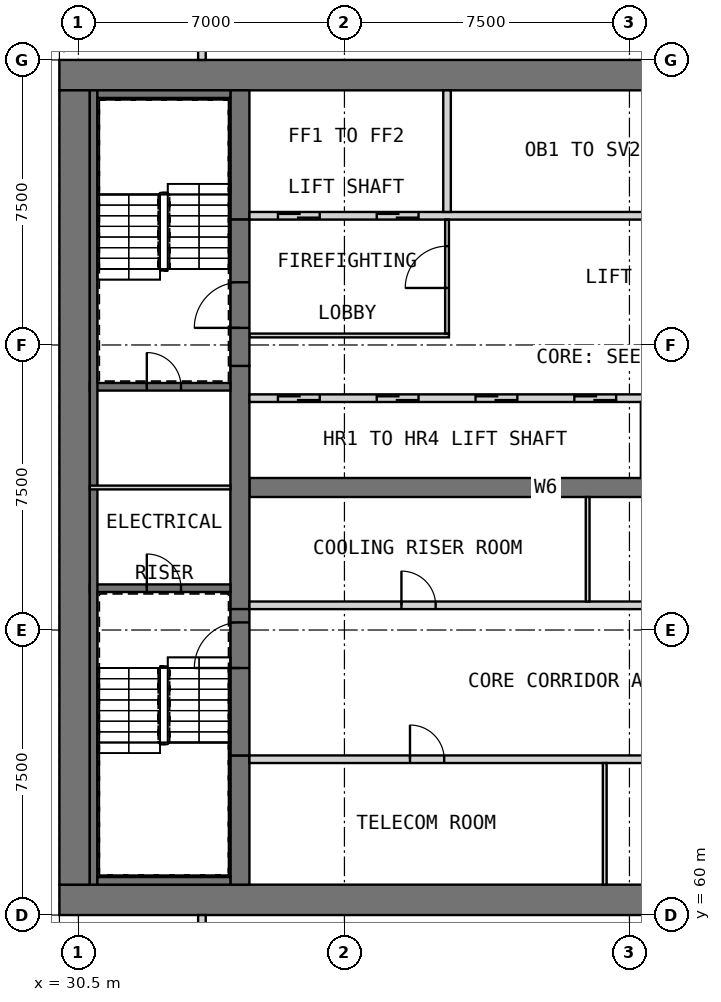
"""IFC4 building model, lengths in metres.
Left out: names, types, materials, properties, quantities, classifications, styles, units other than length and angle.
Written with IfcOpenShell. Run it as: python <this file> out.ifc"""

import sys

from ifc_helpers import new_model, si_unit, direction, frame, frame_2d, origin, place, context, subcontext, project, spatial, rectangle, extrude, element, fill, save


model = new_model("IFC4")
c1 = context("Model", 3, precision=1e-05, world=origin(), true_north=direction((0.0, 1.0)))
c2 = subcontext(c1, "Body", "Model", "MODEL_VIEW")
j1 = project(units=[si_unit("LENGTHUNIT", "METRE"), si_unit("PLANEANGLEUNIT", "RADIAN")], contexts=[c1])
p1 = place(None, origin())
s1 = spatial("IfcSite", under=j1, at=p1, CompositionType="ELEMENT")
p2 = place(p1, origin())
s2 = spatial("IfcBuilding", under=s1, at=p2, CompositionType="ELEMENT")
p3 = place(p2, frame((0.0, 0.0, 214.2)))
s3 = spatial("IfcBuildingStorey", under=s2, at=p3, CompositionType="ELEMENT", Elevation=214.2)
p4 = place(p3, frame((30.0, 60.4, 0.0), z_axis=(0.0, 0.0, 1.0), x_axis=(1.0, 0.0, 0.0)))
e1 = element("IfcWall", 1, at=p4, inside=s3, PredefinedType="SHEAR", context=c2, shape_type="SweptSolid", body=[
    extrude(rectangle(XDim=30.0, YDim=0.8, at=frame_2d((15.0, 0.0))), origin(), (0.0, 0.0, 1.0), 5.5),
])
p5 = place(p4, frame((21.9, 0.0, 0.0)))
e2 = element("IfcOpeningElement", 2, at=p5, cuts=e1, PredefinedType="OPENING", context=c2, shape_type="SweptSolid", body=[
    extrude(rectangle(XDim=1.8, YDim=2.1, at=frame_2d((0.9, 1.05))), frame((0.0, 0.41, 0.0), z_axis=(0.0, -1.0, 0.0), x_axis=(1.0, 0.0, 0.0)), (0.0, 0.0, 1.0), 0.82),
])
p6 = place(p4, frame((26.5, 0.0, 0.0)))
e3 = element("IfcOpeningElement", 3, at=p6, cuts=e1, PredefinedType="OPENING", context=c2, shape_type="SweptSolid", body=[
    extrude(rectangle(XDim=1.2, YDim=2.1, at=frame_2d((0.6, 1.05))), frame((0.0, 0.41, 0.0), z_axis=(0.0, -1.0, 0.0), x_axis=(1.0, 0.0, 0.0)), (0.0, 0.0, 1.0), 0.82),
])
p7 = place(p3, frame((30.0, 82.1, 0.0), z_axis=(0.0, 0.0, 1.0), x_axis=(1.0, 0.0, 0.0)))
e4 = element("IfcWall", 4, at=p7, inside=s3, PredefinedType="SHEAR", context=c2, shape_type="SweptSolid", body=[
    extrude(rectangle(XDim=30.0, YDim=0.8, at=frame_2d((15.0, 0.0))), origin(), (0.0, 0.0, 1.0), 5.5),
])
p8 = place(p3, frame((30.4, 60.8, 0.0), z_axis=(0.0, 0.0, 1.0), x_axis=(0.0, 1.0, 0.0)))
e5 = element("IfcWall", 5, at=p8, inside=s3, PredefinedType="SHEAR", context=c2, shape_type="SweptSolid", body=[
    extrude(rectangle(XDim=20.9, YDim=0.8, at=frame_2d((10.45, 0.0))), origin(), (0.0, 0.0, 1.0), 5.5),
])
p9 = place(p3, frame((35.0, 71.25, 0.0), z_axis=(0.0, 0.0, 1.0), x_axis=(1.0, 0.0, 0.0)))
e6 = element("IfcWall", 6, at=p9, inside=s3, PredefinedType="SHEAR", context=c2, shape_type="SweptSolid", body=[
    extrude(rectangle(XDim=15.6, YDim=0.5, at=frame_2d((7.8, 0.0))), origin(), (0.0, 0.0, 1.0), 5.5),
])
p10 = place(p3, frame((34.75, 60.8, 0.0), z_axis=(0.0, 0.0, 1.0), x_axis=(0.0, 1.0, 0.0)))
e7 = element("IfcWall", 7, at=p10, inside=s3, PredefinedType="SHEAR", context=c2, shape_type="SweptSolid", body=[
    extrude(rectangle(XDim=3.4, YDim=0.5, at=frame_2d((1.7, 0.0))), origin(), (0.0, 0.0, 1.0), 5.5),
])
p11 = place(p3, frame((34.75, 68.05, 0.0), z_axis=(0.0, 0.0, 1.0), x_axis=(0.0, 1.0, 0.0)))
e8 = element("IfcWall", 8, at=p11, inside=s3, PredefinedType="SHEAR", context=c2, shape_type="SweptSolid", body=[
    extrude(rectangle(XDim=6.4, YDim=0.5, at=frame_2d((3.2, 0.0))), origin(), (0.0, 0.0, 1.0), 5.5),
])
p12 = place(p3, frame((34.75, 78.3, 0.0), z_axis=(0.0, 0.0, 1.0), x_axis=(0.0, 1.0, 0.0)))
e9 = element("IfcWall", 9, at=p12, inside=s3, PredefinedType="SHEAR", context=c2, shape_type="SweptSolid", body=[
    extrude(rectangle(XDim=3.4, YDim=0.5, at=frame_2d((1.7, 0.0))), origin(), (0.0, 0.0, 1.0), 5.5),
])
p13 = place(p2, frame((0.0, 0.0, 34.0)))
s4 = spatial("IfcBuildingStorey", under=s2, at=p13, CompositionType="ELEMENT", Elevation=34.0)
for number, where, z_axis, x_axis in (
    (10, (29.7, 61.05, 0.0), (0.0, 0.0, 1.0), (0.0, 1.0, 0.0)),
    (11, (29.7, 65.925, 0.0), (0.0, 0.0, 1.0), (0.0, 1.0, 0.0)),
    (12, (29.7, 70.8, 0.0), (0.0, 0.0, 1.0), (0.0, 1.0, 0.0)),
    (13, (29.7, 75.675, 0.0), (0.0, 0.0, 1.0), (0.0, 1.0, 0.0)),
    (14, (29.7, 80.55, 0.0), (0.0, 0.0, 1.0), (0.0, 1.0, 0.0)),
):
    element("IfcWall", number, at=place(p13, frame(where, z_axis=z_axis, x_axis=x_axis)), inside=s4, PredefinedType="SOLIDWALL", context=c2, shape_type="SweptSolid", body=[
        extrude(rectangle(XDim=0.9, YDim=0.6, at=frame_2d((0.45, 0.0))), origin(), (0.0, 0.0, 1.0), 286.2),
    ])
p14 = place(p3, frame((35.0, 64.1, 0.0), z_axis=(0.0, 0.0, 1.0), x_axis=(1.0, 0.0, 0.0)))
e15 = element("IfcWall", 15, at=p14, inside=s3, PredefinedType="PARTITIONING", context=c2, shape_type="SweptSolid", body=[
    extrude(rectangle(XDim=15.6, YDim=0.2, at=frame_2d((7.8, 0.0))), origin(), (0.0, 0.0, 1.0), 5.25),
])
p15 = place(p14, frame((4.225, 0.0, 0.0)))
e16 = element("IfcOpeningElement", 16, at=p15, cuts=e15, PredefinedType="OPENING", context=c2, shape_type="SweptSolid", body=[
    extrude(rectangle(XDim=0.9, YDim=2.1, at=frame_2d((0.45, 1.05))), frame((0.0, 0.11, 0.0), z_axis=(0.0, -1.0, 0.0), x_axis=(1.0, 0.0, 0.0)), (0.0, 0.0, 1.0), 0.22),
])
p16 = place(p14, frame((12.025, 0.0, 0.0)))
e17 = element("IfcOpeningElement", 17, at=p16, cuts=e15, PredefinedType="OPENING", context=c2, shape_type="SweptSolid", body=[
    extrude(rectangle(XDim=0.9, YDim=2.1, at=frame_2d((0.45, 1.05))), frame((0.0, 0.11, 0.0), z_axis=(0.0, -1.0, 0.0), x_axis=(1.0, 0.0, 0.0)), (0.0, 0.0, 1.0), 0.22),
])
p17 = place(p3, frame((44.35, 60.8, 0.0), z_axis=(0.0, 0.0, 1.0), x_axis=(0.0, 1.0, 0.0)))
e18 = element("IfcWall", 18, at=p17, inside=s3, PredefinedType="PARTITIONING", context=c2, shape_type="SweptSolid", body=[
    extrude(rectangle(XDim=3.2, YDim=0.1, at=frame_2d((1.6, 0.0))), origin(), (0.0, 0.0, 1.0), 5.25),
])
p18 = place(p3, frame((35.0, 68.15, 0.0), z_axis=(0.0, 0.0, 1.0), x_axis=(1.0, 0.0, 0.0)))
e19 = element("IfcWall", 19, at=p18, inside=s3, PredefinedType="PARTITIONING", context=c2, shape_type="SweptSolid", body=[
    extrude(rectangle(XDim=15.6, YDim=0.2, at=frame_2d((7.8, 0.0))), origin(), (0.0, 0.0, 1.0), 5.25),
])
p19 = place(p18, frame((4.0, 0.0, 0.0)))
e20 = element("IfcOpeningElement", 20, at=p19, cuts=e19, PredefinedType="OPENING", context=c2, shape_type="SweptSolid", body=[
    extrude(rectangle(XDim=0.9, YDim=2.1, at=frame_2d((0.45, 1.05))), frame((0.0, 0.11, 0.0), z_axis=(0.0, -1.0, 0.0), x_axis=(1.0, 0.0, 0.0)), (0.0, 0.0, 1.0), 0.22),
])
p20 = place(p18, frame((11.8, 0.0, 0.0)))
e21 = element("IfcOpeningElement", 21, at=p20, cuts=e19, PredefinedType="OPENING", context=c2, shape_type="SweptSolid", body=[
    extrude(rectangle(XDim=0.9, YDim=2.1, at=frame_2d((0.45, 1.05))), frame((0.0, 0.11, 0.0), z_axis=(0.0, -1.0, 0.0), x_axis=(1.0, 0.0, 0.0)), (0.0, 0.0, 1.0), 0.22),
])
p21 = place(p3, frame((43.9, 68.25, 0.0), z_axis=(0.0, 0.0, 1.0), x_axis=(0.0, 1.0, 0.0)))
e22 = element("IfcWall", 22, at=p21, inside=s3, PredefinedType="PARTITIONING", context=c2, shape_type="SweptSolid", body=[
    extrude(rectangle(XDim=2.75, YDim=0.1, at=frame_2d((1.375, 0.0))), origin(), (0.0, 0.0, 1.0), 5.25),
])
p22 = place(p3, frame((35.0, 73.6, 0.0), z_axis=(0.0, 0.0, 1.0), x_axis=(1.0, 0.0, 0.0)))
e23 = element("IfcWall", 23, at=p22, inside=s3, PredefinedType="SOLIDWALL", context=c2, shape_type="SweptSolid", body=[
    extrude(rectangle(XDim=15.6, YDim=0.2, at=frame_2d((7.8, 0.0))), origin(), (0.0, 0.0, 1.0), 5.5),
])
p23 = place(p22, frame((0.75, 0.0, 0.0)))
e24 = element("IfcOpeningElement", 24, at=p23, cuts=e23, PredefinedType="OPENING", context=c2, shape_type="SweptSolid", body=[
    extrude(rectangle(XDim=1.1, YDim=2.1, at=frame_2d((0.55, 1.05))), frame((0.0, 0.11, 0.0), z_axis=(0.0, -1.0, 0.0), x_axis=(1.0, 0.0, 0.0)), (0.0, 0.0, 1.0), 0.22),
])
p24 = place(p22, frame((3.35, 0.0, 0.0)))
e25 = element("IfcOpeningElement", 25, at=p24, cuts=e23, PredefinedType="OPENING", context=c2, shape_type="SweptSolid", body=[
    extrude(rectangle(XDim=1.1, YDim=2.1, at=frame_2d((0.55, 1.05))), frame((0.0, 0.11, 0.0), z_axis=(0.0, -1.0, 0.0), x_axis=(1.0, 0.0, 0.0)), (0.0, 0.0, 1.0), 0.22),
])
p25 = place(p22, frame((5.95, 0.0, 0.0)))
e26 = element("IfcOpeningElement", 26, at=p25, cuts=e23, PredefinedType="OPENING", context=c2, shape_type="SweptSolid", body=[
    extrude(rectangle(XDim=1.1, YDim=2.1, at=frame_2d((0.55, 1.05))), frame((0.0, 0.11, 0.0), z_axis=(0.0, -1.0, 0.0), x_axis=(1.0, 0.0, 0.0)), (0.0, 0.0, 1.0), 0.22),
])
p26 = place(p22, frame((8.55, 0.0, 0.0)))
e27 = element("IfcOpeningElement", 27, at=p26, cuts=e23, PredefinedType="OPENING", context=c2, shape_type="SweptSolid", body=[
    extrude(rectangle(XDim=1.1, YDim=2.1, at=frame_2d((0.55, 1.05))), frame((0.0, 0.11, 0.0), z_axis=(0.0, -1.0, 0.0), x_axis=(1.0, 0.0, 0.0)), (0.0, 0.0, 1.0), 0.22),
])
p27 = place(p22, frame((11.15, 0.0, 0.0)))
e28 = element("IfcOpeningElement", 28, at=p27, cuts=e23, PredefinedType="OPENING", context=c2, shape_type="SweptSolid", body=[
    extrude(rectangle(XDim=1.1, YDim=2.1, at=frame_2d((0.55, 1.05))), frame((0.0, 0.11, 0.0), z_axis=(0.0, -1.0, 0.0), x_axis=(1.0, 0.0, 0.0)), (0.0, 0.0, 1.0), 0.22),
])
p28 = place(p22, frame((13.75, 0.0, 0.0)))
e29 = element("IfcOpeningElement", 29, at=p28, cuts=e23, PredefinedType="OPENING", context=c2, shape_type="SweptSolid", body=[
    extrude(rectangle(XDim=1.1, YDim=2.1, at=frame_2d((0.55, 1.05))), frame((0.0, 0.11, 0.0), z_axis=(0.0, -1.0, 0.0), x_axis=(1.0, 0.0, 0.0)), (0.0, 0.0, 1.0), 0.22),
])
p29 = place(p3, frame((45.4, 71.5, 0.0), z_axis=(0.0, 0.0, 1.0), x_axis=(0.0, 1.0, 0.0)))
e30 = element("IfcWall", 30, at=p29, inside=s3, PredefinedType="SOLIDWALL", context=c2, shape_type="SweptSolid", body=[
    extrude(rectangle(XDim=2.0, YDim=0.2, at=frame_2d((1.0, 0.0))), origin(), (0.0, 0.0, 1.0), 5.5),
])
p30 = place(p3, frame((35.0, 78.4, 0.0), z_axis=(0.0, 0.0, 1.0), x_axis=(1.0, 0.0, 0.0)))
e31 = element("IfcWall", 31, at=p30, inside=s3, PredefinedType="SOLIDWALL", context=c2, shape_type="SweptSolid", body=[
    extrude(rectangle(XDim=15.6, YDim=0.2, at=frame_2d((7.8, 0.0))), origin(), (0.0, 0.0, 1.0), 5.5),
])
p31 = place(p30, frame((0.75, 0.0, 0.0)))
e32 = element("IfcOpeningElement", 32, at=p31, cuts=e31, PredefinedType="OPENING", context=c2, shape_type="SweptSolid", body=[
    extrude(rectangle(XDim=1.1, YDim=2.1, at=frame_2d((0.55, 1.05))), frame((0.0, 0.11, 0.0), z_axis=(0.0, -1.0, 0.0), x_axis=(1.0, 0.0, 0.0)), (0.0, 0.0, 1.0), 0.22),
])
p32 = place(p30, frame((3.35, 0.0, 0.0)))
e33 = element("IfcOpeningElement", 33, at=p32, cuts=e31, PredefinedType="OPENING", context=c2, shape_type="SweptSolid", body=[
    extrude(rectangle(XDim=1.1, YDim=2.1, at=frame_2d((0.55, 1.05))), frame((0.0, 0.11, 0.0), z_axis=(0.0, -1.0, 0.0), x_axis=(1.0, 0.0, 0.0)), (0.0, 0.0, 1.0), 0.22),
])
p33 = place(p30, frame((11.15, 0.0, 0.0)))
e34 = element("IfcOpeningElement", 34, at=p33, cuts=e31, PredefinedType="OPENING", context=c2, shape_type="SweptSolid", body=[
    extrude(rectangle(XDim=1.1, YDim=2.1, at=frame_2d((0.55, 1.05))), frame((0.0, 0.11, 0.0), z_axis=(0.0, -1.0, 0.0), x_axis=(1.0, 0.0, 0.0)), (0.0, 0.0, 1.0), 0.22),
])
p34 = place(p30, frame((13.75, 0.0, 0.0)))
e35 = element("IfcOpeningElement", 35, at=p34, cuts=e31, PredefinedType="OPENING", context=c2, shape_type="SweptSolid", body=[
    extrude(rectangle(XDim=1.1, YDim=2.1, at=frame_2d((0.55, 1.05))), frame((0.0, 0.11, 0.0), z_axis=(0.0, -1.0, 0.0), x_axis=(1.0, 0.0, 0.0)), (0.0, 0.0, 1.0), 0.22),
])
p35 = place(p3, frame((40.2, 78.5, 0.0), z_axis=(0.0, 0.0, 1.0), x_axis=(0.0, 1.0, 0.0)))
e36 = element("IfcWall", 36, at=p35, inside=s3, PredefinedType="SOLIDWALL", context=c2, shape_type="SweptSolid", body=[
    extrude(rectangle(XDim=3.2, YDim=0.2, at=frame_2d((1.6, 0.0))), origin(), (0.0, 0.0, 1.0), 5.5),
])
p36 = place(p3, frame((35.0, 75.25, 0.0), z_axis=(0.0, 0.0, 1.0), x_axis=(1.0, 0.0, 0.0)))
e37 = element("IfcWall", 37, at=p36, inside=s3, PredefinedType="PARTITIONING", context=c2, shape_type="SweptSolid", body=[
    extrude(rectangle(XDim=5.25, YDim=0.1, at=frame_2d((2.625, 0.0))), origin(), (0.0, 0.0, 1.0), 5.25),
])
p37 = place(p3, frame((40.2, 75.3, 0.0), z_axis=(0.0, 0.0, 1.0), x_axis=(0.0, 1.0, 0.0)))
e38 = element("IfcWall", 38, at=p37, inside=s3, PredefinedType="PARTITIONING", context=c2, shape_type="SweptSolid", body=[
    extrude(rectangle(XDim=3.0, YDim=0.1, at=frame_2d((1.5, 0.0))), origin(), (0.0, 0.0, 1.0), 5.25),
])
p38 = place(p37, frame((1.2, 0.0, 0.0)))
e39 = element("IfcOpeningElement", 39, at=p38, cuts=e38, PredefinedType="OPENING", context=c2, shape_type="SweptSolid", body=[
    extrude(rectangle(XDim=1.1, YDim=2.1, at=frame_2d((0.55, 1.05))), frame((0.0, 0.06, 0.0), z_axis=(0.0, -1.0, 0.0), x_axis=(1.0, 0.0, 0.0)), (0.0, 0.0, 1.0), 0.12),
])
p39 = place(p3, frame((34.75, 64.2, 0.0), z_axis=(0.0, 0.0, 1.0), x_axis=(0.0, 1.0, 0.0)))
e40 = element("IfcWall", 40, at=p39, inside=s3, PredefinedType="SOLIDWALL", context=c2, shape_type="SweptSolid", body=[
    extrude(rectangle(XDim=3.85, YDim=0.5, at=frame_2d((1.925, 0.0))), origin(), (0.0, 0.0, 1.0), 4.3),
])
p40 = place(p39, frame((2.3, 0.0, 0.0)))
e41 = element("IfcOpeningElement", 41, at=p40, cuts=e40, PredefinedType="OPENING", context=c2, shape_type="SweptSolid", body=[
    extrude(rectangle(XDim=1.2, YDim=2.1, at=frame_2d((0.6, 1.05))), frame((0.0, 0.26, 0.0), z_axis=(0.0, -1.0, 0.0), x_axis=(1.0, 0.0, 0.0)), (0.0, 0.0, 1.0), 0.52),
])
p41 = place(p3, frame((34.75, 74.45, 0.0), z_axis=(0.0, 0.0, 1.0), x_axis=(0.0, 1.0, 0.0)))
e42 = element("IfcWall", 42, at=p41, inside=s3, PredefinedType="SOLIDWALL", context=c2, shape_type="SweptSolid", body=[
    extrude(rectangle(XDim=3.85, YDim=0.5, at=frame_2d((1.925, 0.0))), origin(), (0.0, 0.0, 1.0), 4.3),
])
p42 = place(p41, frame((1.0, 0.0, 0.0)))
e43 = element("IfcOpeningElement", 43, at=p42, cuts=e42, PredefinedType="OPENING", context=c2, shape_type="SweptSolid", body=[
    extrude(rectangle(XDim=1.2, YDim=2.1, at=frame_2d((0.6, 1.05))), frame((0.0, 0.26, 0.0), z_axis=(0.0, -1.0, 0.0), x_axis=(1.0, 0.0, 0.0)), (0.0, 0.0, 1.0), 0.52),
])
p43 = place(p3, frame((30.8, 68.6, 0.0), z_axis=(0.0, 0.0, 1.0), x_axis=(1.0, 0.0, 0.0)))
e44 = element("IfcWall", 44, at=p43, inside=s3, PredefinedType="SOLIDWALL", context=c2, shape_type="SweptSolid", body=[
    extrude(rectangle(XDim=3.7, YDim=0.2, at=frame_2d((1.85, 0.0))), origin(), (0.0, 0.0, 1.0), 5.25),
])
p44 = place(p43, frame((1.5, 0.0, 0.0)))
e45 = element("IfcOpeningElement", 45, at=p44, cuts=e44, PredefinedType="OPENING", context=c2, shape_type="SweptSolid", body=[
    extrude(rectangle(XDim=0.9, YDim=2.1, at=frame_2d((0.45, 1.05))), frame((0.0, 0.11, 0.0), z_axis=(0.0, -1.0, 0.0), x_axis=(1.0, 0.0, 0.0)), (0.0, 0.0, 1.0), 0.22),
])
p45 = place(p3, frame((30.8, 73.9, 0.0), z_axis=(0.0, 0.0, 1.0), x_axis=(1.0, 0.0, 0.0)))
e46 = element("IfcWall", 46, at=p45, inside=s3, PredefinedType="SOLIDWALL", context=c2, shape_type="SweptSolid", body=[
    extrude(rectangle(XDim=3.7, YDim=0.2, at=frame_2d((1.85, 0.0))), origin(), (0.0, 0.0, 1.0), 5.25),
])
p46 = place(p45, frame((1.5, 0.0, 0.0)))
e47 = element("IfcOpeningElement", 47, at=p46, cuts=e46, PredefinedType="OPENING", context=c2, shape_type="SweptSolid", body=[
    extrude(rectangle(XDim=0.9, YDim=2.1, at=frame_2d((0.45, 1.05))), frame((0.0, 0.11, 0.0), z_axis=(0.0, -1.0, 0.0), x_axis=(1.0, 0.0, 0.0)), (0.0, 0.0, 1.0), 0.22),
])
p47 = place(p3, frame((30.9, 60.8, 0.0), z_axis=(0.0, 0.0, 1.0), x_axis=(0.0, 1.0, 0.0)))
e48 = element("IfcWall", 48, at=p47, inside=s3, PredefinedType="SOLIDWALL", context=c2, shape_type="SweptSolid", body=[
    extrude(rectangle(XDim=20.9, YDim=0.2, at=frame_2d((10.45, 0.0))), origin(), (0.0, 0.0, 1.0), 5.25),
])
for number, where, z_axis, x_axis in (
    (49, (31.0, 60.9, 0.0), (0.0, 0.0, 1.0), (1.0, 0.0, 0.0)),
    (50, (31.0, 81.6, 0.0), (0.0, 0.0, 1.0), (1.0, 0.0, 0.0)),
):
    element("IfcWall", number, at=place(p3, frame(where, z_axis=z_axis, x_axis=x_axis)), inside=s3, PredefinedType="SOLIDWALL", context=c2, shape_type="SweptSolid", body=[
        extrude(rectangle(XDim=3.5, YDim=0.2, at=frame_2d((1.75, 0.0))), origin(), (0.0, 0.0, 1.0), 5.25),
    ])
p48 = place(p3, frame((30.8, 71.25, 0.0), z_axis=(0.0, 0.0, 1.0), x_axis=(1.0, 0.0, 0.0)))
e51 = element("IfcWall", 51, at=p48, inside=s3, PredefinedType="PARTITIONING", context=c2, shape_type="SweptSolid", body=[
    extrude(rectangle(XDim=3.7, YDim=0.1, at=frame_2d((1.85, 0.0))), origin(), (0.0, 0.0, 1.0), 5.25),
])
for number, where, z_axis, x_axis in (
    (52, (33.75, 58.0, 0.0), (0.0, 0.0, 1.0), (0.0, 1.0, 0.0)),
    (53, (33.75, 82.5, 0.0), (0.0, 0.0, 1.0), (0.0, 1.0, 0.0)),
):
    element("IfcWall", number, at=place(p3, frame(where, z_axis=z_axis, x_axis=x_axis)), inside=s3, PredefinedType="PARTITIONING", context=c2, shape_type="SweptSolid", body=[
        extrude(rectangle(XDim=2.0, YDim=0.2, at=frame_2d((1.0, 0.0))), origin(), (0.0, 0.0, 1.0), 5.25),
    ])
p49 = place(p15, origin())
e54 = element("IfcDoor", 54, at=p49, inside=s3, OperationType="SINGLE_SWING_LEFT", PredefinedType="DOOR", context=c2, shape_type="SweptSolid", body=[
    extrude(rectangle(XDim=0.9, YDim=2.1, at=frame_2d((0.45, 1.05))), frame((0.0, 0.025, 0.0), z_axis=(0.0, -1.0, 0.0), x_axis=(1.0, 0.0, 0.0)), (0.0, 0.0, 1.0), 0.05),
])
fill(e16, e54)
p50 = place(p19, origin())
e55 = element("IfcDoor", 55, at=p50, inside=s3, OperationType="SINGLE_SWING_LEFT", PredefinedType="DOOR", context=c2, shape_type="SweptSolid", body=[
    extrude(rectangle(XDim=0.9, YDim=2.1, at=frame_2d((0.45, 1.05))), frame((0.0, 0.025, 0.0), z_axis=(0.0, -1.0, 0.0), x_axis=(1.0, 0.0, 0.0)), (0.0, 0.0, 1.0), 0.05),
])
fill(e20, e55)
p51 = place(p23, origin())
e56 = element("IfcDoor", 56, at=p51, inside=s3, OperationType="DOUBLE_DOOR_SLIDING", PredefinedType="DOOR", context=c2, shape_type="SweptSolid", body=[
    extrude(rectangle(XDim=1.1, YDim=2.1, at=frame_2d((0.55, 1.05))), frame((0.0, 0.025, 0.0), z_axis=(0.0, -1.0, 0.0), x_axis=(1.0, 0.0, 0.0)), (0.0, 0.0, 1.0), 0.05),
])
fill(e24, e56)
p52 = place(p24, origin())
e57 = element("IfcDoor", 57, at=p52, inside=s3, OperationType="DOUBLE_DOOR_SLIDING", PredefinedType="DOOR", context=c2, shape_type="SweptSolid", body=[
    extrude(rectangle(XDim=1.1, YDim=2.1, at=frame_2d((0.55, 1.05))), frame((0.0, 0.025, 0.0), z_axis=(0.0, -1.0, 0.0), x_axis=(1.0, 0.0, 0.0)), (0.0, 0.0, 1.0), 0.05),
])
fill(e25, e57)
p53 = place(p25, origin())
e58 = element("IfcDoor", 58, at=p53, inside=s3, OperationType="DOUBLE_DOOR_SLIDING", PredefinedType="DOOR", context=c2, shape_type="SweptSolid", body=[
    extrude(rectangle(XDim=1.1, YDim=2.1, at=frame_2d((0.55, 1.05))), frame((0.0, 0.025, 0.0), z_axis=(0.0, -1.0, 0.0), x_axis=(1.0, 0.0, 0.0)), (0.0, 0.0, 1.0), 0.05),
])
fill(e26, e58)
p54 = place(p26, origin())
e59 = element("IfcDoor", 59, at=p54, inside=s3, OperationType="DOUBLE_DOOR_SLIDING", PredefinedType="DOOR", context=c2, shape_type="SweptSolid", body=[
    extrude(rectangle(XDim=1.1, YDim=2.1, at=frame_2d((0.55, 1.05))), frame((0.0, 0.025, 0.0), z_axis=(0.0, -1.0, 0.0), x_axis=(1.0, 0.0, 0.0)), (0.0, 0.0, 1.0), 0.05),
])
fill(e27, e59)
p55 = place(p31, origin())
e60 = element("IfcDoor", 60, at=p55, inside=s3, OperationType="DOUBLE_DOOR_SLIDING", PredefinedType="DOOR", context=c2, shape_type="SweptSolid", body=[
    extrude(rectangle(XDim=1.1, YDim=2.1, at=frame_2d((0.55, 1.05))), frame((0.0, 0.025, 0.0), z_axis=(0.0, -1.0, 0.0), x_axis=(1.0, 0.0, 0.0)), (0.0, 0.0, 1.0), 0.05),
])
fill(e32, e60)
p56 = place(p32, origin())
e61 = element("IfcDoor", 61, at=p56, inside=s3, OperationType="DOUBLE_DOOR_SLIDING", PredefinedType="DOOR", context=c2, shape_type="SweptSolid", body=[
    extrude(rectangle(XDim=1.1, YDim=2.1, at=frame_2d((0.55, 1.05))), frame((0.0, 0.025, 0.0), z_axis=(0.0, -1.0, 0.0), x_axis=(1.0, 0.0, 0.0)), (0.0, 0.0, 1.0), 0.05),
])
fill(e33, e61)
p57 = place(p38, origin())
e62 = element("IfcDoor", 62, at=p57, inside=s3, OperationType="SINGLE_SWING_LEFT", PredefinedType="DOOR", context=c2, shape_type="SweptSolid", body=[
    extrude(rectangle(XDim=1.1, YDim=2.1, at=frame_2d((0.55, 1.05))), frame((0.0, 0.025, 0.0), z_axis=(0.0, -1.0, 0.0), x_axis=(1.0, 0.0, 0.0)), (0.0, 0.0, 1.0), 0.05),
])
fill(e39, e62)
p58 = place(p40, origin())
e63 = element("IfcDoor", 63, at=p58, inside=s3, OperationType="SINGLE_SWING_LEFT", PredefinedType="DOOR", context=c2, shape_type="SweptSolid", body=[
    extrude(rectangle(XDim=1.2, YDim=2.1, at=frame_2d((0.6, 1.05))), frame((0.0, 0.025, 0.0), z_axis=(0.0, -1.0, 0.0), x_axis=(1.0, 0.0, 0.0)), (0.0, 0.0, 1.0), 0.05),
])
fill(e41, e63)
p59 = place(p42, origin())
e64 = element("IfcDoor", 64, at=p59, inside=s3, OperationType="SINGLE_SWING_RIGHT", PredefinedType="DOOR", context=c2, shape_type="SweptSolid", body=[
    extrude(rectangle(XDim=1.2, YDim=2.1, at=frame_2d((0.6, 1.05))), frame((0.0, 0.025, 0.0), z_axis=(0.0, -1.0, 0.0), x_axis=(1.0, 0.0, 0.0)), (0.0, 0.0, 1.0), 0.05),
])
fill(e43, e64)
p60 = place(p44, origin())
e65 = element("IfcDoor", 65, at=p60, inside=s3, OperationType="SINGLE_SWING_LEFT", PredefinedType="DOOR", context=c2, shape_type="SweptSolid", body=[
    extrude(rectangle(XDim=0.9, YDim=2.1, at=frame_2d((0.45, 1.05))), frame((0.0, 0.025, 0.0), z_axis=(0.0, -1.0, 0.0), x_axis=(1.0, 0.0, 0.0)), (0.0, 0.0, 1.0), 0.05),
])
fill(e45, e65)
p61 = place(p46, origin())
e66 = element("IfcDoor", 66, at=p61, inside=s3, OperationType="SINGLE_SWING_RIGHT", PredefinedType="DOOR", context=c2, shape_type="SweptSolid", body=[
    extrude(rectangle(XDim=0.9, YDim=2.1, at=frame_2d((0.45, 1.05))), frame((0.0, 0.025, 0.0), z_axis=(0.0, -1.0, 0.0), x_axis=(1.0, 0.0, 0.0)), (0.0, 0.0, 1.0), 0.05),
])
fill(e47, e66)
save(model, sys.argv[1])
